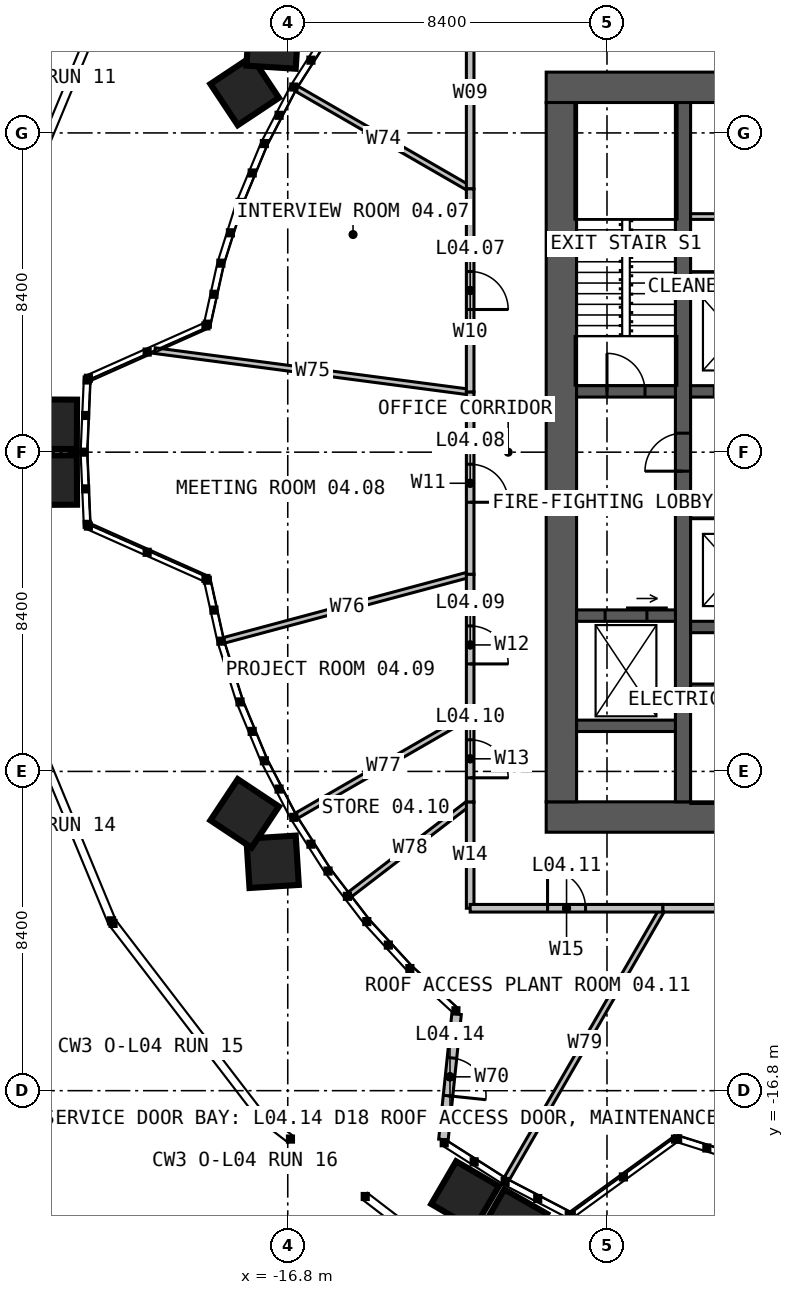
"""IFC4 building model, lengths in metres.
Left out: names, types, materials, properties, quantities, classifications, styles, units other than length and angle.
Written with IfcOpenShell. Run it as: python <this file> out.ifc"""

import sys

from ifc_helpers import new_model, si_unit, direction, frame, frame_2d, origin, place, context, subcontext, project, spatial, rectangle, extrude, element, fill, save


model = new_model("IFC4")
c1 = context("Model", 3, precision=1e-05, world=origin(), true_north=direction((0.0, 1.0)))
c2 = subcontext(c1, "Body", "Model", "MODEL_VIEW")
j1 = project(units=[si_unit("LENGTHUNIT", "METRE"), si_unit("PLANEANGLEUNIT", "RADIAN")], contexts=[c1])
p1 = place(None, origin())
s1 = spatial("IfcSite", under=j1, at=p1, CompositionType="ELEMENT")
p2 = place(p1, origin())
s2 = spatial("IfcBuilding", under=s1, at=p2, CompositionType="ELEMENT")
p3 = place(p2, frame((0.0, 0.0, 21.0)))
s3 = spatial("IfcBuildingStorey", under=s2, at=p3, CompositionType="ELEMENT", Elevation=21.0)
p4 = place(p3, frame((-10.0, 9.6, 0.0), z_axis=(0.0, 0.0, 1.0), x_axis=(1.0, 0.0, 0.0)))
e1 = element("IfcWall", 1, at=p4, inside=s3, PredefinedType="SOLIDWALL", context=c2, shape_type="SweptSolid", body=[
    extrude(rectangle(XDim=20.0, YDim=0.8, at=frame_2d((10.0, 0.0))), origin(), (0.0, 0.0, 1.0), 4.0),
])
p5 = place(p4, frame((9.4, 0.0, 0.0)))
e2 = element("IfcOpeningElement", 2, at=p5, cuts=e1, PredefinedType="OPENING", context=c2, shape_type="SweptSolid", body=[
    extrude(rectangle(XDim=1.2, YDim=2.2, at=frame_2d((0.6, 1.1))), frame((0.0, 0.41, 0.0), z_axis=(0.0, -1.0, 0.0), x_axis=(1.0, 0.0, 0.0)), (0.0, 0.0, 1.0), 0.82),
])
p6 = place(p3, frame((10.0, -9.6, 0.0), z_axis=(0.0, 0.0, 1.0), x_axis=(-1.0, 0.0, 0.0)))
e3 = element("IfcWall", 3, at=p6, inside=s3, PredefinedType="SOLIDWALL", context=c2, shape_type="SweptSolid", body=[
    extrude(rectangle(XDim=20.0, YDim=0.8, at=frame_2d((10.0, 0.0))), origin(), (0.0, 0.0, 1.0), 4.0),
])
p7 = place(p6, frame((6.875, 0.0, 0.0)))
e4 = element("IfcOpeningElement", 4, at=p7, cuts=e3, PredefinedType="OPENING", context=c2, shape_type="SweptSolid", body=[
    extrude(rectangle(XDim=1.2, YDim=2.2, at=frame_2d((0.6, 1.1))), frame((0.0, 0.41, 0.0), z_axis=(0.0, -1.0, 0.0), x_axis=(1.0, 0.0, 0.0)), (0.0, 0.0, 1.0), 0.82),
])
p8 = place(p3, frame((-9.6, 9.2, 0.0), z_axis=(0.0, 0.0, 1.0), x_axis=(0.0, -1.0, 0.0)))
e5 = element("IfcWall", 5, at=p8, inside=s3, PredefinedType="SOLIDWALL", context=c2, shape_type="SweptSolid", body=[
    extrude(rectangle(XDim=18.4, YDim=0.8, at=frame_2d((9.2, 0.0))), origin(), (0.0, 0.0, 1.0), 4.0),
])
p9 = place(p3, frame((-6.4, -9.2, 0.0), z_axis=(0.0, 0.0, 1.0), x_axis=(0.0, 1.0, 0.0)))
e6 = element("IfcWall", 6, at=p9, inside=s3, PredefinedType="SOLIDWALL", context=c2, shape_type="SweptSolid", body=[
    extrude(rectangle(XDim=18.4, YDim=0.4, at=frame_2d((9.2, 0.0))), origin(), (0.0, 0.0, 1.0), 4.0),
])
p10 = place(p9, frame((8.7, 0.0, 0.0)))
e7 = element("IfcOpeningElement", 7, at=p10, cuts=e6, PredefinedType="OPENING", context=c2, shape_type="SweptSolid", body=[
    extrude(rectangle(XDim=1.0, YDim=2.2, at=frame_2d((0.5, 1.1))), frame((0.0, 0.21, 0.0), z_axis=(0.0, -1.0, 0.0), x_axis=(1.0, 0.0, 0.0)), (0.0, 0.0, 1.0), 0.42),
])
p11 = place(p3, frame((-6.2, 1.6, 0.0), z_axis=(0.0, 0.0, 1.0), x_axis=(1.0, 0.0, 0.0)))
e8 = element("IfcWall", 8, at=p11, inside=s3, PredefinedType="SOLIDWALL", context=c2, shape_type="SweptSolid", body=[
    extrude(rectangle(XDim=4.85, YDim=0.3, at=frame_2d((2.425, 0.0))), origin(), (0.0, 0.0, 1.0), 4.0),
])
p12 = place(p11, frame((0.625, 0.0, 0.0)))
e9 = element("IfcOpeningElement", 9, at=p12, cuts=e8, PredefinedType="OPENING", context=c2, shape_type="SweptSolid", body=[
    extrude(rectangle(XDim=1.1, YDim=2.2, at=frame_2d((0.55, 1.1))), frame((0.0, 0.16, 0.0), z_axis=(0.0, -1.0, 0.0), x_axis=(1.0, 0.0, 0.0)), (0.0, 0.0, 1.0), 0.32),
])
p13 = place(p11, frame((3.15, 0.0, 0.0)))
e10 = element("IfcOpeningElement", 10, at=p13, cuts=e8, PredefinedType="OPENING", context=c2, shape_type="SweptSolid", body=[
    extrude(rectangle(XDim=1.1, YDim=2.2, at=frame_2d((0.55, 1.1))), frame((0.0, 0.16, 0.0), z_axis=(0.0, -1.0, 0.0), x_axis=(1.0, 0.0, 0.0)), (0.0, 0.0, 1.0), 0.32),
])
p14 = place(p3, frame((-6.2, 4.6, 0.0), z_axis=(0.0, 0.0, 1.0), x_axis=(1.0, 0.0, 0.0)))
e11 = element("IfcWall", 11, at=p14, inside=s3, PredefinedType="SOLIDWALL", context=c2, shape_type="SweptSolid", body=[
    extrude(rectangle(XDim=4.85, YDim=0.3, at=frame_2d((2.425, 0.0))), origin(), (0.0, 0.0, 1.0), 4.0),
])
for number, where, z_axis, x_axis in (
    (12, (-6.2, -1.6, 0.0), (0.0, 0.0, 1.0), (1.0, 0.0, 0.0)),
    (13, (-6.2, -4.6, 0.0), (0.0, 0.0, 1.0), (1.0, 0.0, 0.0)),
):
    element("IfcWall", number, at=place(p3, frame(where, z_axis=z_axis, x_axis=x_axis)), inside=s3, PredefinedType="SOLIDWALL", context=c2, shape_type="SweptSolid", body=[
        extrude(rectangle(XDim=7.4, YDim=0.3, at=frame_2d((3.7, 0.0))), origin(), (0.0, 0.0, 1.0), 4.0),
    ])
p15 = place(p3, frame((-6.2, -6.2, 0.0), z_axis=(0.0, 0.0, 1.0), x_axis=(1.0, 0.0, 0.0)))
e14 = element("IfcWall", 14, at=p15, inside=s3, PredefinedType="SOLIDWALL", context=c2, shape_type="SweptSolid", body=[
    extrude(rectangle(XDim=7.4, YDim=0.2, at=frame_2d((3.7, 0.0))), origin(), (0.0, 0.0, 1.0), 4.0),
])
p16 = place(p3, frame((-9.2, 1.6, 0.0), z_axis=(0.0, 0.0, 1.0), x_axis=(1.0, 0.0, 0.0)))
e15 = element("IfcWall", 15, at=p16, inside=s3, PredefinedType="SOLIDWALL", context=c2, shape_type="SweptSolid", body=[
    extrude(rectangle(XDim=2.6, YDim=0.3, at=frame_2d((1.3, 0.0))), origin(), (0.0, 0.0, 1.0), 4.0),
])
p17 = place(p16, frame((0.8, 0.0, 0.0)))
e16 = element("IfcOpeningElement", 16, at=p17, cuts=e15, PredefinedType="OPENING", context=c2, shape_type="SweptSolid", body=[
    extrude(rectangle(XDim=1.0, YDim=2.2, at=frame_2d((0.5, 1.1))), frame((0.0, 0.16, 0.0), z_axis=(0.0, -1.0, 0.0), x_axis=(1.0, 0.0, 0.0)), (0.0, 0.0, 1.0), 0.32),
])
p18 = place(p3, frame((-9.2, -4.3, 0.0), z_axis=(0.0, 0.0, 1.0), x_axis=(1.0, 0.0, 0.0)))
e17 = element("IfcWall", 17, at=p18, inside=s3, PredefinedType="SOLIDWALL", context=c2, shape_type="SweptSolid", body=[
    extrude(rectangle(XDim=2.6, YDim=0.3, at=frame_2d((1.3, 0.0))), origin(), (0.0, 0.0, 1.0), 4.0),
])
p19 = place(p18, frame((0.75, 0.0, 0.0)))
e18 = element("IfcOpeningElement", 18, at=p19, cuts=e17, PredefinedType="OPENING", context=c2, shape_type="SweptSolid", body=[
    extrude(rectangle(XDim=1.1, YDim=2.2, at=frame_2d((0.55, 1.1))), frame((0.0, 0.16, 0.0), z_axis=(0.0, -1.0, 0.0), x_axis=(1.0, 0.0, 0.0)), (0.0, 0.0, 1.0), 0.32),
])
p20 = place(p3, frame((-9.2, -7.2, 0.0), z_axis=(0.0, 0.0, 1.0), x_axis=(1.0, 0.0, 0.0)))
e19 = element("IfcWall", 19, at=p20, inside=s3, PredefinedType="SOLIDWALL", context=c2, shape_type="SweptSolid", body=[
    extrude(rectangle(XDim=2.6, YDim=0.3, at=frame_2d((1.3, 0.0))), origin(), (0.0, 0.0, 1.0), 4.0),
])
p21 = place(p3, frame((-12.358, -14.784, 0.0), z_axis=(0.0, 0.0, 1.0), x_axis=(-0.104080228289, -0.994568904641, 0.0)))
e20 = element("IfcWall", 20, at=p21, inside=s3, PredefinedType="SOLIDWALL", context=c2, shape_type="SweptSolid", body=[
    extrude(rectangle(XDim=3.322, YDim=0.25, at=frame_2d((1.661, 0.0))), origin(), (0.0, 0.0, 1.0), 3.8),
])
p22 = place(p21, frame((1.161, 0.0, 0.0)))
e21 = element("IfcOpeningElement", 21, at=p22, cuts=e20, PredefinedType="OPENING", context=c2, shape_type="SweptSolid", body=[
    extrude(rectangle(XDim=1.0, YDim=2.2, at=frame_2d((0.5, 1.1))), frame((0.0, 0.135, 0.0), z_axis=(0.0, -1.0, 0.0), x_axis=(1.0, 0.0, 0.0)), (0.0, 0.0, 1.0), 0.27),
])
p23 = place(p3, frame((-6.2, 6.2, 0.0), z_axis=(0.0, 0.0, 1.0), x_axis=(1.0, 0.0, 0.0)))
e22 = element("IfcWall", 22, at=p23, inside=s3, PredefinedType="PARTITIONING", context=c2, shape_type="SweptSolid", body=[
    extrude(rectangle(XDim=4.85, YDim=0.15, at=frame_2d((2.425, 0.0))), origin(), (0.0, 0.0, 1.0), 3.75),
])
p24 = place(p23, frame((3.15, 0.0, 0.0)))
e23 = element("IfcOpeningElement", 23, at=p24, cuts=e22, PredefinedType="OPENING", context=c2, shape_type="SweptSolid", body=[
    extrude(rectangle(XDim=1.0, YDim=2.2, at=frame_2d((0.5, 1.1))), frame((0.0, 0.085, 0.0), z_axis=(0.0, -1.0, 0.0), x_axis=(1.0, 0.0, 0.0)), (0.0, 0.0, 1.0), 0.17),
])
p25 = place(p23, frame((0.75, 0.0, 0.0)))
e24 = element("IfcOpeningElement", 24, at=p25, cuts=e22, PredefinedType="OPENING", context=c2, shape_type="SweptSolid", body=[
    extrude(rectangle(XDim=0.9, YDim=2.2, at=frame_2d((0.45, 1.1))), frame((0.0, 0.085, 0.0), z_axis=(0.0, -1.0, 0.0), x_axis=(1.0, 0.0, 0.0)), (0.0, 0.0, 1.0), 0.17),
])
p26 = place(p3, frame((-12.0, 6.928, 0.0), z_axis=(0.0, 0.0, 1.0), x_axis=(-0.866029667373, 0.499992615176, 0.0)))
e25 = element("IfcWall", 25, at=p26, inside=s3, PredefinedType="PARTITIONING", context=c2, shape_type="SweptSolid", body=[
    extrude(rectangle(XDim=5.267, YDim=0.15, at=frame_2d((2.634, 0.0))), origin(), (0.0, 0.0, 1.0), 2.79),
])
p27 = place(p3, frame((-12.0, 1.58, 0.0), z_axis=(0.0, 0.0, 1.0), x_axis=(-0.991443666399, 0.130535268634, 0.0)))
e26 = element("IfcWall", 26, at=p27, inside=s3, PredefinedType="PARTITIONING", context=c2, shape_type="SweptSolid", body=[
    extrude(rectangle(XDim=8.368, YDim=0.15, at=frame_2d((4.184, 0.0))), origin(), (0.0, 0.0, 1.0), 2.79),
])
p28 = place(p3, frame((-12.0, -3.215, 0.0), z_axis=(0.0, 0.0, 1.0), x_axis=(-0.965926419694, -0.258816830476, 0.0)))
e27 = element("IfcWall", 27, at=p28, inside=s3, PredefinedType="PARTITIONING", context=c2, shape_type="SweptSolid", body=[
    extrude(rectangle(XDim=6.7, YDim=0.15, at=frame_2d((3.35, 0.0))), origin(), (0.0, 0.0, 1.0), 2.79),
])
p29 = place(p3, frame((-12.0, -6.928, 0.0), z_axis=(0.0, 0.0, 1.0), x_axis=(-0.866029667373, -0.499992615176, 0.0)))
e28 = element("IfcWall", 28, at=p29, inside=s3, PredefinedType="PARTITIONING", context=c2, shape_type="SweptSolid", body=[
    extrude(rectangle(XDim=5.267, YDim=0.15, at=frame_2d((2.634, 0.0))), origin(), (0.0, 0.0, 1.0), 2.79),
])
p30 = place(p3, frame((-12.0, -9.208, 0.0), z_axis=(0.0, 0.0, 1.0), x_axis=(-0.7933554916, -0.608758625359, 0.0)))
e29 = element("IfcWall", 29, at=p30, inside=s3, PredefinedType="PARTITIONING", context=c2, shape_type="SweptSolid", body=[
    extrude(rectangle(XDim=3.979, YDim=0.15, at=frame_2d((1.99, 0.0))), origin(), (0.0, 0.0, 1.0), 2.79),
])
p31 = place(p3, frame((-6.928, -12.0, 0.0), z_axis=(0.0, 0.0, 1.0), x_axis=(-0.499995243048, -0.866028150195, 0.0)))
e30 = element("IfcWall", 30, at=p31, inside=s3, PredefinedType="PARTITIONING", context=c2, shape_type="SweptSolid", body=[
    extrude(rectangle(XDim=8.212, YDim=0.15, at=frame_2d((4.106, 0.0))), origin(), (0.0, 0.0, 1.0), 2.79),
])
p32 = place(p3, frame((-12.0, 12.0, 0.0), z_axis=(0.0, 0.0, 1.0), x_axis=(0.0, -1.0, 0.0)))
e31 = element("IfcWall", 31, at=p32, inside=s3, PredefinedType="PARTITIONING", context=c2, shape_type="SweptSolid", body=[
    extrude(rectangle(XDim=5.072, YDim=0.2, at=frame_2d((2.536, 0.0))), origin(), (0.0, 0.0, 1.0), 3.8),
])
p33 = place(p3, frame((-12.0, 6.928, 0.0), z_axis=(0.0, 0.0, 1.0), x_axis=(0.0, -1.0, 0.0)))
e32 = element("IfcWall", 32, at=p33, inside=s3, PredefinedType="PARTITIONING", context=c2, shape_type="SweptSolid", body=[
    extrude(rectangle(XDim=5.348, YDim=0.2, at=frame_2d((2.674, 0.0))), origin(), (0.0, 0.0, 1.0), 3.8),
])
p34 = place(p33, frame((2.174, 0.0, 0.0)))
e33 = element("IfcOpeningElement", 33, at=p34, cuts=e32, PredefinedType="OPENING", context=c2, shape_type="SweptSolid", body=[
    extrude(rectangle(XDim=1.0, YDim=2.2, at=frame_2d((0.5, 1.1))), frame((0.0, 0.11, 0.0), z_axis=(0.0, -1.0, 0.0), x_axis=(1.0, 0.0, 0.0)), (0.0, 0.0, 1.0), 0.22),
])
p35 = place(p3, frame((-12.0, 1.58, 0.0), z_axis=(0.0, 0.0, 1.0), x_axis=(0.0, -1.0, 0.0)))
e34 = element("IfcWall", 34, at=p35, inside=s3, PredefinedType="PARTITIONING", context=c2, shape_type="SweptSolid", body=[
    extrude(rectangle(XDim=4.795, YDim=0.2, at=frame_2d((2.397, 0.0))), origin(), (0.0, 0.0, 1.0), 3.8),
])
p36 = place(p35, frame((1.898, 0.0, 0.0)))
e35 = element("IfcOpeningElement", 35, at=p36, cuts=e34, PredefinedType="OPENING", context=c2, shape_type="SweptSolid", body=[
    extrude(rectangle(XDim=1.0, YDim=2.2, at=frame_2d((0.5, 1.1))), frame((0.0, 0.11, 0.0), z_axis=(0.0, -1.0, 0.0), x_axis=(1.0, 0.0, 0.0)), (0.0, 0.0, 1.0), 0.22),
])
p37 = place(p3, frame((-12.0, -3.215, 0.0), z_axis=(0.0, 0.0, 1.0), x_axis=(0.0, -1.0, 0.0)))
e36 = element("IfcWall", 36, at=p37, inside=s3, PredefinedType="PARTITIONING", context=c2, shape_type="SweptSolid", body=[
    extrude(rectangle(XDim=3.713, YDim=0.2, at=frame_2d((1.856, 0.0))), origin(), (0.0, 0.0, 1.0), 3.8),
])
p38 = place(p37, frame((1.356, 0.0, 0.0)))
e37 = element("IfcOpeningElement", 37, at=p38, cuts=e36, PredefinedType="OPENING", context=c2, shape_type="SweptSolid", body=[
    extrude(rectangle(XDim=1.0, YDim=2.2, at=frame_2d((0.5, 1.1))), frame((0.0, 0.11, 0.0), z_axis=(0.0, -1.0, 0.0), x_axis=(1.0, 0.0, 0.0)), (0.0, 0.0, 1.0), 0.22),
])
p39 = place(p3, frame((-12.0, -6.928, 0.0), z_axis=(0.0, 0.0, 1.0), x_axis=(0.0, -1.0, 0.0)))
e38 = element("IfcWall", 38, at=p39, inside=s3, PredefinedType="PARTITIONING", context=c2, shape_type="SweptSolid", body=[
    extrude(rectangle(XDim=2.28, YDim=0.2, at=frame_2d((1.14, 0.0))), origin(), (0.0, 0.0, 1.0), 3.8),
])
p40 = place(p39, frame((0.64, 0.0, 0.0)))
e39 = element("IfcOpeningElement", 39, at=p40, cuts=e38, PredefinedType="OPENING", context=c2, shape_type="SweptSolid", body=[
    extrude(rectangle(XDim=1.0, YDim=2.2, at=frame_2d((0.5, 1.1))), frame((0.0, 0.11, 0.0), z_axis=(0.0, -1.0, 0.0), x_axis=(1.0, 0.0, 0.0)), (0.0, 0.0, 1.0), 0.22),
])
p41 = place(p3, frame((-12.0, -9.208, 0.0), z_axis=(0.0, 0.0, 1.0), x_axis=(0.0, -1.0, 0.0)))
e40 = element("IfcWall", 40, at=p41, inside=s3, PredefinedType="PARTITIONING", context=c2, shape_type="SweptSolid", body=[
    extrude(rectangle(XDim=2.792, YDim=0.2, at=frame_2d((1.396, 0.0))), origin(), (0.0, 0.0, 1.0), 3.8),
])
p42 = place(p3, frame((-12.0, -12.0, 0.0), z_axis=(0.0, 0.0, 1.0), x_axis=(1.0, 0.0, 0.0)))
e41 = element("IfcWall", 41, at=p42, inside=s3, PredefinedType="PARTITIONING", context=c2, shape_type="SweptSolid", body=[
    extrude(rectangle(XDim=5.072, YDim=0.2, at=frame_2d((2.536, 0.0))), origin(), (0.0, 0.0, 1.0), 3.8),
])
p43 = place(p42, frame((2.036, 0.0, 0.0)))
e42 = element("IfcOpeningElement", 42, at=p43, cuts=e41, PredefinedType="OPENING", context=c2, shape_type="SweptSolid", body=[
    extrude(rectangle(XDim=1.0, YDim=2.2, at=frame_2d((0.5, 1.1))), frame((0.0, 0.11, 0.0), z_axis=(0.0, -1.0, 0.0), x_axis=(1.0, 0.0, 0.0)), (0.0, 0.0, 1.0), 0.22),
])
p44 = place(p3, frame((-6.928, -12.0, 0.0), z_axis=(0.0, 0.0, 1.0), x_axis=(1.0, 0.0, 0.0)))
e43 = element("IfcWall", 43, at=p44, inside=s3, PredefinedType="PARTITIONING", context=c2, shape_type="SweptSolid", body=[
    extrude(rectangle(XDim=8.508, YDim=0.2, at=frame_2d((4.254, 0.0))), origin(), (0.0, 0.0, 1.0), 3.8),
])
p45 = place(p44, frame((3.754, 0.0, 0.0)))
e44 = element("IfcOpeningElement", 44, at=p45, cuts=e43, PredefinedType="OPENING", context=c2, shape_type="SweptSolid", body=[
    extrude(rectangle(XDim=1.0, YDim=2.2, at=frame_2d((0.5, 1.1))), frame((0.0, 0.11, 0.0), z_axis=(0.0, -1.0, 0.0), x_axis=(1.0, 0.0, 0.0)), (0.0, 0.0, 1.0), 0.22),
])
p46 = place(p22, origin())
e45 = element("IfcDoor", 45, at=p46, inside=s3, OperationType="SINGLE_SWING_RIGHT", PredefinedType="DOOR", context=c2, shape_type="SweptSolid", body=[
    extrude(rectangle(XDim=1.0, YDim=2.2, at=frame_2d((0.5, 1.1))), frame((0.0, 0.025, 0.0), z_axis=(0.0, -1.0, 0.0), x_axis=(1.0, 0.0, 0.0)), (0.0, 0.0, 1.0), 0.05),
])
fill(e21, e45)
p47 = place(p10, origin())
e46 = element("IfcDoor", 46, at=p47, inside=s3, OperationType="SINGLE_SWING_LEFT", PredefinedType="DOOR", context=c2, shape_type="SweptSolid", body=[
    extrude(rectangle(XDim=1.0, YDim=2.2, at=frame_2d((0.5, 1.1))), frame((0.0, 0.025, 0.0), z_axis=(0.0, -1.0, 0.0), x_axis=(1.0, 0.0, 0.0)), (0.0, 0.0, 1.0), 0.05),
])
fill(e7, e46)
p48 = place(p17, origin())
e47 = element("IfcDoor", 47, at=p48, inside=s3, OperationType="SINGLE_SWING_LEFT", PredefinedType="DOOR", context=c2, shape_type="SweptSolid", body=[
    extrude(rectangle(XDim=1.0, YDim=2.2, at=frame_2d((0.5, 1.1))), frame((0.0, 0.025, 0.0), z_axis=(0.0, -1.0, 0.0), x_axis=(1.0, 0.0, 0.0)), (0.0, 0.0, 1.0), 0.05),
])
fill(e16, e47)
p49 = place(p19, origin())
e48 = element("IfcDoor", 48, at=p49, inside=s3, OperationType="SLIDING_TO_LEFT", PredefinedType="DOOR", context=c2, shape_type="SweptSolid", body=[
    extrude(rectangle(XDim=1.1, YDim=2.2, at=frame_2d((0.55, 1.1))), frame((0.0, 0.025, 0.0), z_axis=(0.0, -1.0, 0.0), x_axis=(1.0, 0.0, 0.0)), (0.0, 0.0, 1.0), 0.05),
])
fill(e18, e48)
p50 = place(p34, origin())
e49 = element("IfcDoor", 49, at=p50, inside=s3, OperationType="SINGLE_SWING_RIGHT", PredefinedType="DOOR", context=c2, shape_type="SweptSolid", body=[
    extrude(rectangle(XDim=1.0, YDim=2.2, at=frame_2d((0.5, 1.1))), frame((0.0, 0.025, 0.0), z_axis=(0.0, -1.0, 0.0), x_axis=(1.0, 0.0, 0.0)), (0.0, 0.0, 1.0), 0.05),
])
fill(e33, e49)
p51 = place(p36, origin())
e50 = element("IfcDoor", 50, at=p51, inside=s3, OperationType="SINGLE_SWING_RIGHT", PredefinedType="DOOR", context=c2, shape_type="SweptSolid", body=[
    extrude(rectangle(XDim=1.0, YDim=2.2, at=frame_2d((0.5, 1.1))), frame((0.0, 0.025, 0.0), z_axis=(0.0, -1.0, 0.0), x_axis=(1.0, 0.0, 0.0)), (0.0, 0.0, 1.0), 0.05),
])
fill(e35, e50)
p52 = place(p38, origin())
e51 = element("IfcDoor", 51, at=p52, inside=s3, OperationType="SINGLE_SWING_RIGHT", PredefinedType="DOOR", context=c2, shape_type="SweptSolid", body=[
    extrude(rectangle(XDim=1.0, YDim=2.2, at=frame_2d((0.5, 1.1))), frame((0.0, 0.025, 0.0), z_axis=(0.0, -1.0, 0.0), x_axis=(1.0, 0.0, 0.0)), (0.0, 0.0, 1.0), 0.05),
])
fill(e37, e51)
p53 = place(p40, origin())
e52 = element("IfcDoor", 52, at=p53, inside=s3, OperationType="SINGLE_SWING_RIGHT", PredefinedType="DOOR", context=c2, shape_type="SweptSolid", body=[
    extrude(rectangle(XDim=1.0, YDim=2.2, at=frame_2d((0.5, 1.1))), frame((0.0, 0.025, 0.0), z_axis=(0.0, -1.0, 0.0), x_axis=(1.0, 0.0, 0.0)), (0.0, 0.0, 1.0), 0.05),
])
fill(e39, e52)
p54 = place(p43, origin())
e53 = element("IfcDoor", 53, at=p54, inside=s3, OperationType="SINGLE_SWING_LEFT", PredefinedType="DOOR", context=c2, shape_type="SweptSolid", body=[
    extrude(rectangle(XDim=1.0, YDim=2.2, at=frame_2d((0.5, 1.1))), frame((0.0, 0.025, 0.0), z_axis=(0.0, -1.0, 0.0), x_axis=(1.0, 0.0, 0.0)), (0.0, 0.0, 1.0), 0.05),
])
fill(e42, e53)
save(model, sys.argv[1])
